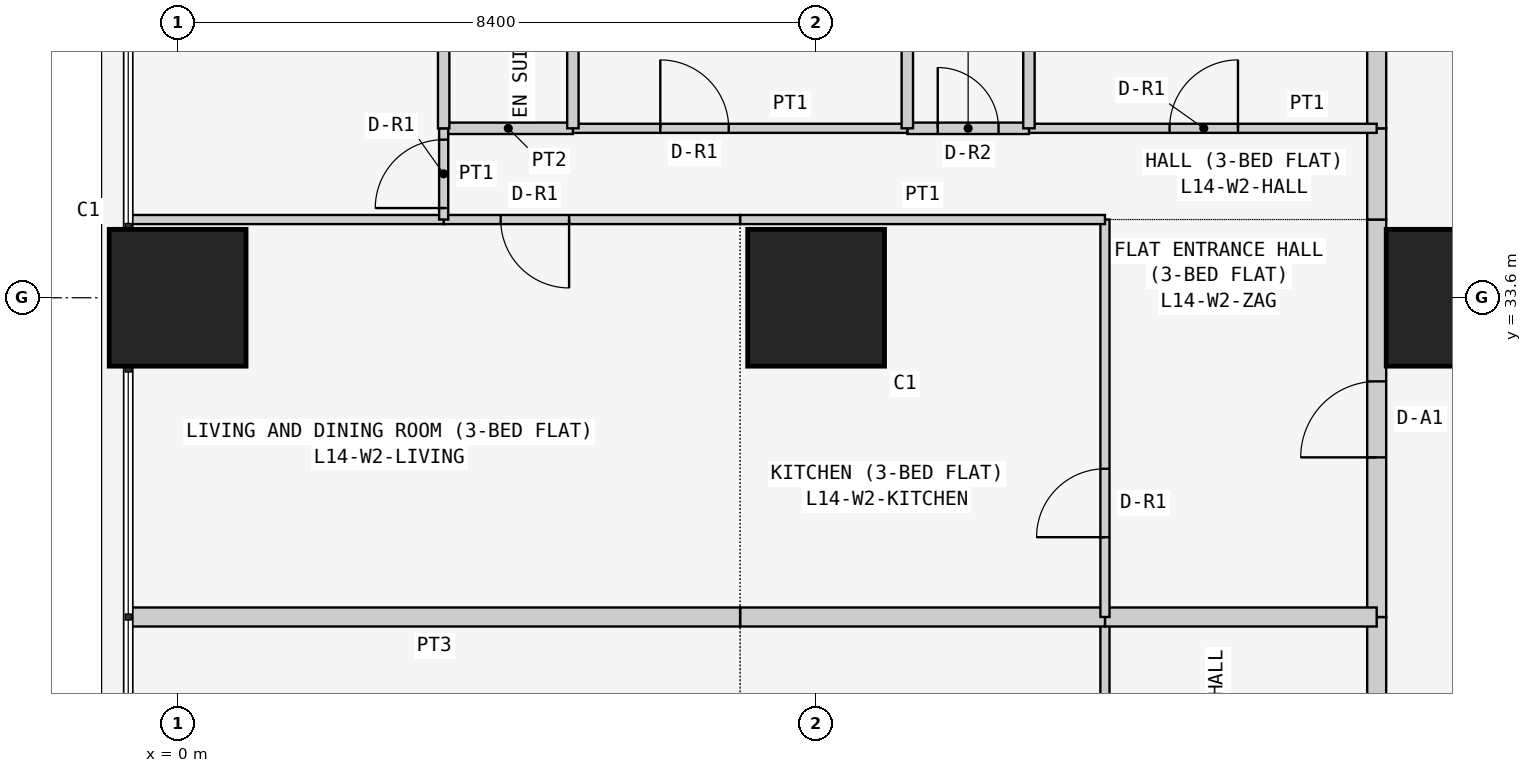
"""IFC4 building model, lengths in metres.
Left out: names, types, materials, properties, quantities, classifications, styles, units other than length and angle.
Written with IfcOpenShell. Run it as: python <this file> out.ifc"""

import sys

from ifc_helpers import new_model, si_unit, direction, frame, frame_2d, origin, origin_2d, place, context, subcontext, project, spatial, rectangle, extrude, element, fill, save


model = new_model("IFC4")
c1 = context("Model", 3, precision=1e-05, world=origin(), true_north=direction((0.0, 1.0)))
c2 = subcontext(c1, "Body", "Model", "MODEL_VIEW")
j1 = project(units=[si_unit("LENGTHUNIT", "METRE"), si_unit("PLANEANGLEUNIT", "RADIAN")], contexts=[c1])
p1 = place(None, origin())
s1 = spatial("IfcSite", under=j1, at=p1, CompositionType="ELEMENT")
p2 = place(p1, origin())
s2 = spatial("IfcBuilding", under=s1, at=p2, CompositionType="ELEMENT")
p3 = place(p2, frame((0.0, 0.0, 59.7)))
s3 = spatial("IfcBuildingStorey", under=s2, at=p3, CompositionType="ELEMENT", Elevation=59.7)
for number, where, z_axis, x_axis in (
    (1, (0.0, 33.6, 0.0), (0.0, 0.0, 1.0), (1.0, 0.0, 0.0)),
    (2, (8.4, 33.6, 0.0), (0.0, 0.0, 1.0), (1.0, 0.0, 0.0)),
    (3, (16.8, 33.6, 0.0), (0.0, 0.0, 1.0), (1.0, 0.0, 0.0)),
):
    element("IfcColumn", number, at=place(p3, frame(where, z_axis=z_axis, x_axis=x_axis)), inside=s3, PredefinedType="COLUMN", context=c2, shape_type="SweptSolid", body=[
        extrude(rectangle(XDim=1.8, YDim=1.8, at=origin_2d()), origin(), (0.0, 0.0, 1.0), 3.6),
    ])
p4 = place(p3, frame((15.775, 24.171, 0.0), z_axis=(0.0, 0.0, 1.0), x_axis=(0.0, 1.0, 0.0)))
e4 = element("IfcWall", 4, at=p4, inside=s3, PredefinedType="PARTITIONING", context=c2, shape_type="SweptSolid", body=[
    extrude(rectangle(XDim=5.229, YDim=0.25, at=frame_2d((2.615, 0.0))), origin(), (0.0, 0.0, 1.0), 3.45),
])
p5 = place(p4, frame((2.129, 0.0, 0.0)))
e5 = element("IfcOpeningElement", 5, at=p5, cuts=e4, PredefinedType="OPENING", context=c2, shape_type="SweptSolid", body=[
    extrude(rectangle(XDim=1.0, YDim=2.1, at=frame_2d((0.5, 1.05))), frame((0.0, 0.135, 0.0), z_axis=(0.0, -1.0, 0.0), x_axis=(1.0, 0.0, 0.0)), (0.0, 0.0, 1.0), 0.27),
])
p6 = place(p3, frame((15.775, 29.4, 0.0), z_axis=(0.0, 0.0, 1.0), x_axis=(0.0, 1.0, 0.0)))
e6 = element("IfcWall", 6, at=p6, inside=s3, PredefinedType="PARTITIONING", context=c2, shape_type="SweptSolid", body=[
    extrude(rectangle(XDim=5.229, YDim=0.25, at=frame_2d((2.615, 0.0))), origin(), (0.0, 0.0, 1.0), 3.45),
])
p7 = place(p6, frame((2.1, 0.0, 0.0)))
e7 = element("IfcOpeningElement", 7, at=p7, cuts=e6, PredefinedType="OPENING", context=c2, shape_type="SweptSolid", body=[
    extrude(rectangle(XDim=1.0, YDim=2.1, at=frame_2d((0.5, 1.05))), frame((0.0, 0.135, 0.0), z_axis=(0.0, -1.0, 0.0), x_axis=(1.0, 0.0, 0.0)), (0.0, 0.0, 1.0), 0.27),
])
p8 = place(p3, frame((15.775, 34.629, 0.0), z_axis=(0.0, 0.0, 1.0), x_axis=(0.0, 1.0, 0.0)))
e8 = element("IfcWall", 8, at=p8, inside=s3, PredefinedType="PARTITIONING", context=c2, shape_type="SweptSolid", body=[
    extrude(rectangle(XDim=1.2, YDim=0.25, at=frame_2d((0.6, 0.0))), origin(), (0.0, 0.0, 1.0), 3.45),
])
p9 = place(p3, frame((15.775, 35.829, 0.0), z_axis=(0.0, 0.0, 1.0), x_axis=(0.0, 1.0, 0.0)))
e9 = element("IfcWall", 9, at=p9, inside=s3, PredefinedType="PARTITIONING", context=c2, shape_type="SweptSolid", body=[
    extrude(rectangle(XDim=6.871, YDim=0.25, at=frame_2d((3.436, 0.0))), origin(), (0.0, 0.0, 1.0), 3.45),
])
p10 = place(p3, frame((12.2, 29.4, 0.0), z_axis=(0.0, 0.0, 1.0), x_axis=(0.0, -1.0, 0.0)))
e10 = element("IfcWall", 10, at=p10, inside=s3, PredefinedType="PARTITIONING", context=c2, shape_type="SweptSolid", body=[
    extrude(rectangle(XDim=5.229, YDim=0.12, at=frame_2d((2.615, 0.0))), origin(), (0.0, 0.0, 1.0), 3.45),
])
p11 = place(p10, frame((1.05, 0.0, 0.0)))
e11 = element("IfcOpeningElement", 11, at=p11, cuts=e10, PredefinedType="OPENING", context=c2, shape_type="SweptSolid", body=[
    extrude(rectangle(XDim=0.9, YDim=2.1, at=frame_2d((0.45, 1.05))), frame((0.0, 0.07, 0.0), z_axis=(0.0, -1.0, 0.0), x_axis=(1.0, 0.0, 0.0)), (0.0, 0.0, 1.0), 0.14),
])
p12 = place(p3, frame((15.775, 29.4, 0.0), z_axis=(0.0, 0.0, 1.0), x_axis=(-1.0, 0.0, 0.0)))
e12 = element("IfcWall", 12, at=p12, inside=s3, PredefinedType="PARTITIONING", context=c2, shape_type="SweptSolid", body=[
    extrude(rectangle(XDim=3.575, YDim=0.25, at=frame_2d((1.788, 0.0))), origin(), (0.0, 0.0, 1.0), 3.45),
])
p13 = place(p3, frame((12.2, 29.4, 0.0), z_axis=(0.0, 0.0, 1.0), x_axis=(-1.0, 0.0, 0.0)))
e13 = element("IfcWall", 13, at=p13, inside=s3, PredefinedType="PARTITIONING", context=c2, shape_type="SweptSolid", body=[
    extrude(rectangle(XDim=4.8, YDim=0.25, at=frame_2d((2.4, 0.0))), origin(), (0.0, 0.0, 1.0), 3.45),
])
p14 = place(p3, frame((7.4, 29.4, 0.0), z_axis=(0.0, 0.0, 1.0), x_axis=(-1.0, 0.0, 0.0)))
e14 = element("IfcWall", 14, at=p14, inside=s3, PredefinedType="PARTITIONING", context=c2, shape_type="SweptSolid", body=[
    extrude(rectangle(XDim=8.05, YDim=0.25, at=frame_2d((4.025, 0.0))), origin(), (0.0, 0.0, 1.0), 3.45),
])
p15 = place(p3, frame((12.2, 29.4, 0.0), z_axis=(0.0, 0.0, 1.0), x_axis=(0.0, 1.0, 0.0)))
e15 = element("IfcWall", 15, at=p15, inside=s3, PredefinedType="PARTITIONING", context=c2, shape_type="SweptSolid", body=[
    extrude(rectangle(XDim=5.229, YDim=0.12, at=frame_2d((2.615, 0.0))), origin(), (0.0, 0.0, 1.0), 3.45),
])
p16 = place(p15, frame((1.05, 0.0, 0.0)))
e16 = element("IfcOpeningElement", 16, at=p16, cuts=e15, PredefinedType="OPENING", context=c2, shape_type="SweptSolid", body=[
    extrude(rectangle(XDim=0.9, YDim=2.1, at=frame_2d((0.45, 1.05))), frame((0.0, 0.07, 0.0), z_axis=(0.0, -1.0, 0.0), x_axis=(1.0, 0.0, 0.0)), (0.0, 0.0, 1.0), 0.14),
])
p17 = place(p3, frame((7.4, 34.629, 0.0), z_axis=(0.0, 0.0, 1.0), x_axis=(1.0, 0.0, 0.0)))
e17 = element("IfcWall", 17, at=p17, inside=s3, PredefinedType="PARTITIONING", context=c2, shape_type="SweptSolid", body=[
    extrude(rectangle(XDim=4.8, YDim=0.12, at=frame_2d((2.4, 0.0))), origin(), (0.0, 0.0, 1.0), 3.45),
])
p18 = place(p3, frame((3.5, 34.629, 0.0), z_axis=(0.0, 0.0, 1.0), x_axis=(1.0, 0.0, 0.0)))
e18 = element("IfcWall", 18, at=p18, inside=s3, PredefinedType="PARTITIONING", context=c2, shape_type="SweptSolid", body=[
    extrude(rectangle(XDim=3.9, YDim=0.12, at=frame_2d((1.95, 0.0))), origin(), (0.0, 0.0, 1.0), 3.45),
])
p19 = place(p18, frame((0.75, 0.0, 0.0)))
e19 = element("IfcOpeningElement", 19, at=p19, cuts=e18, PredefinedType="OPENING", context=c2, shape_type="SweptSolid", body=[
    extrude(rectangle(XDim=0.9, YDim=2.1, at=frame_2d((0.45, 1.05))), frame((0.0, 0.07, 0.0), z_axis=(0.0, -1.0, 0.0), x_axis=(1.0, 0.0, 0.0)), (0.0, 0.0, 1.0), 0.14),
])
p20 = place(p3, frame((-0.65, 34.629, 0.0), z_axis=(0.0, 0.0, 1.0), x_axis=(1.0, 0.0, 0.0)))
e20 = element("IfcWall", 20, at=p20, inside=s3, PredefinedType="PARTITIONING", context=c2, shape_type="SweptSolid", body=[
    extrude(rectangle(XDim=4.15, YDim=0.12, at=frame_2d((2.075, 0.0))), origin(), (0.0, 0.0, 1.0), 3.45),
])
p21 = place(p3, frame((11.2, 35.829, 0.0), z_axis=(0.0, 0.0, 1.0), x_axis=(1.0, 0.0, 0.0)))
e21 = element("IfcWall", 21, at=p21, inside=s3, PredefinedType="PARTITIONING", context=c2, shape_type="SweptSolid", body=[
    extrude(rectangle(XDim=4.575, YDim=0.12, at=frame_2d((2.288, 0.0))), origin(), (0.0, 0.0, 1.0), 3.45),
])
p22 = place(p21, frame((1.85, 0.0, 0.0)))
e22 = element("IfcOpeningElement", 22, at=p22, cuts=e21, PredefinedType="OPENING", context=c2, shape_type="SweptSolid", body=[
    extrude(rectangle(XDim=0.9, YDim=2.1, at=frame_2d((0.45, 1.05))), frame((0.0, 0.07, 0.0), z_axis=(0.0, -1.0, 0.0), x_axis=(1.0, 0.0, 0.0)), (0.0, 0.0, 1.0), 0.14),
])
p23 = place(p3, frame((9.6, 35.829, 0.0), z_axis=(0.0, 0.0, 1.0), x_axis=(1.0, 0.0, 0.0)))
e23 = element("IfcWall", 23, at=p23, inside=s3, PredefinedType="PARTITIONING", context=c2, shape_type="SweptSolid", body=[
    extrude(rectangle(XDim=1.6, YDim=0.15, at=frame_2d((0.8, 0.0))), origin(), (0.0, 0.0, 1.0), 3.45),
])
p24 = place(p23, frame((0.4, 0.0, 0.0)))
e24 = element("IfcOpeningElement", 24, at=p24, cuts=e23, PredefinedType="OPENING", context=c2, shape_type="SweptSolid", body=[
    extrude(rectangle(XDim=0.8, YDim=2.1, at=frame_2d((0.4, 1.05))), frame((0.0, 0.085, 0.0), z_axis=(0.0, -1.0, 0.0), x_axis=(1.0, 0.0, 0.0)), (0.0, 0.0, 1.0), 0.17),
])
p25 = place(p3, frame((5.2, 35.829, 0.0), z_axis=(0.0, 0.0, 1.0), x_axis=(1.0, 0.0, 0.0)))
e25 = element("IfcWall", 25, at=p25, inside=s3, PredefinedType="PARTITIONING", context=c2, shape_type="SweptSolid", body=[
    extrude(rectangle(XDim=4.4, YDim=0.12, at=frame_2d((2.2, 0.0))), origin(), (0.0, 0.0, 1.0), 3.45),
])
p26 = place(p25, frame((1.15, 0.0, 0.0)))
e26 = element("IfcOpeningElement", 26, at=p26, cuts=e25, PredefinedType="OPENING", context=c2, shape_type="SweptSolid", body=[
    extrude(rectangle(XDim=0.9, YDim=2.1, at=frame_2d((0.45, 1.05))), frame((0.0, 0.07, 0.0), z_axis=(0.0, -1.0, 0.0), x_axis=(1.0, 0.0, 0.0)), (0.0, 0.0, 1.0), 0.14),
])
p27 = place(p3, frame((3.5, 35.829, 0.0), z_axis=(0.0, 0.0, 1.0), x_axis=(1.0, 0.0, 0.0)))
e27 = element("IfcWall", 27, at=p27, inside=s3, PredefinedType="PARTITIONING", context=c2, shape_type="SweptSolid", body=[
    extrude(rectangle(XDim=1.7, YDim=0.15, at=frame_2d((0.85, 0.0))), origin(), (0.0, 0.0, 1.0), 3.45),
])
p28 = place(p3, frame((3.5, 34.629, 0.0), z_axis=(0.0, 0.0, 1.0), x_axis=(0.0, 1.0, 0.0)))
e28 = element("IfcWall", 28, at=p28, inside=s3, PredefinedType="PARTITIONING", context=c2, shape_type="SweptSolid", body=[
    extrude(rectangle(XDim=1.2, YDim=0.12, at=frame_2d((0.6, 0.0))), origin(), (0.0, 0.0, 1.0), 3.45),
])
p29 = place(p28, frame((0.151, 0.0, 0.0)))
e29 = element("IfcOpeningElement", 29, at=p29, cuts=e28, PredefinedType="OPENING", context=c2, shape_type="SweptSolid", body=[
    extrude(rectangle(XDim=0.9, YDim=2.1, at=frame_2d((0.45, 1.05))), frame((0.0, 0.07, 0.0), z_axis=(0.0, -1.0, 0.0), x_axis=(1.0, 0.0, 0.0)), (0.0, 0.0, 1.0), 0.14),
])
for number, where, z_axis, x_axis in (
    (30, (11.2, 35.829, 0.0), (0.0, 0.0, 1.0), (0.0, 1.0, 0.0)),
    (31, (9.6, 35.829, 0.0), (0.0, 0.0, 1.0), (0.0, 1.0, 0.0)),
    (32, (5.2, 35.829, 0.0), (0.0, 0.0, 1.0), (0.0, 1.0, 0.0)),
):
    element("IfcWall", number, at=place(p3, frame(where, z_axis=z_axis, x_axis=x_axis)), inside=s3, PredefinedType="PARTITIONING", context=c2, shape_type="SweptSolid", body=[
        extrude(rectangle(XDim=6.871, YDim=0.15, at=frame_2d((3.436, 0.0))), origin(), (0.0, 0.0, 1.0), 3.45),
    ])
p30 = place(p3, frame((3.5, 35.829, 0.0), z_axis=(0.0, 0.0, 1.0), x_axis=(0.0, 1.0, 0.0)))
e33 = element("IfcWall", 33, at=p30, inside=s3, PredefinedType="PARTITIONING", context=c2, shape_type="SweptSolid", body=[
    extrude(rectangle(XDim=6.871, YDim=0.15, at=frame_2d((3.436, 0.0))), origin(), (0.0, 0.0, 1.0), 3.45),
])
p31 = place(p30, frame((3.171, 0.0, 0.0)))
e34 = element("IfcOpeningElement", 34, at=p31, cuts=e33, PredefinedType="OPENING", context=c2, shape_type="SweptSolid", body=[
    extrude(rectangle(XDim=0.8, YDim=2.1, at=frame_2d((0.4, 1.05))), frame((0.0, 0.085, 0.0), z_axis=(0.0, -1.0, 0.0), x_axis=(1.0, 0.0, 0.0)), (0.0, 0.0, 1.0), 0.17),
])
p32 = place(p7, origin())
e35 = element("IfcDoor", 35, at=p32, inside=s3, OperationType="SINGLE_SWING_LEFT", PredefinedType="DOOR", context=c2, shape_type="SweptSolid", body=[
    extrude(rectangle(XDim=1.0, YDim=2.1, at=frame_2d((0.5, 1.05))), frame((0.0, 0.025, 0.0), z_axis=(0.0, -1.0, 0.0), x_axis=(1.0, 0.0, 0.0)), (0.0, 0.0, 1.0), 0.05),
])
fill(e7, e35)
p33 = place(p16, origin())
e36 = element("IfcDoor", 36, at=p33, inside=s3, OperationType="SINGLE_SWING_LEFT", PredefinedType="DOOR", context=c2, shape_type="SweptSolid", body=[
    extrude(rectangle(XDim=0.9, YDim=2.1, at=frame_2d((0.45, 1.05))), frame((0.0, 0.025, 0.0), z_axis=(0.0, -1.0, 0.0), x_axis=(1.0, 0.0, 0.0)), (0.0, 0.0, 1.0), 0.05),
])
fill(e16, e36)
p34 = place(p19, frame((0.9, 0.0, 0.0), z_axis=(0.0, 0.0, 1.0), x_axis=(-1.0, 0.0, 0.0)))
e37 = element("IfcDoor", 37, at=p34, inside=s3, OperationType="SINGLE_SWING_LEFT", PredefinedType="DOOR", context=c2, shape_type="SweptSolid", body=[
    extrude(rectangle(XDim=0.9, YDim=2.1, at=frame_2d((0.45, 1.05))), frame((0.0, 0.025, 0.0), z_axis=(0.0, -1.0, 0.0), x_axis=(1.0, 0.0, 0.0)), (0.0, 0.0, 1.0), 0.05),
])
fill(e19, e37)
p35 = place(p22, origin())
e38 = element("IfcDoor", 38, at=p35, inside=s3, OperationType="SINGLE_SWING_RIGHT", PredefinedType="DOOR", context=c2, shape_type="SweptSolid", body=[
    extrude(rectangle(XDim=0.9, YDim=2.1, at=frame_2d((0.45, 1.05))), frame((0.0, 0.025, 0.0), z_axis=(0.0, -1.0, 0.0), x_axis=(1.0, 0.0, 0.0)), (0.0, 0.0, 1.0), 0.05),
])
fill(e22, e38)
p36 = place(p24, origin())
e39 = element("IfcDoor", 39, at=p36, inside=s3, OperationType="SINGLE_SWING_LEFT", PredefinedType="DOOR", context=c2, shape_type="SweptSolid", body=[
    extrude(rectangle(XDim=0.8, YDim=2.1, at=frame_2d((0.4, 1.05))), frame((0.0, 0.025, 0.0), z_axis=(0.0, -1.0, 0.0), x_axis=(1.0, 0.0, 0.0)), (0.0, 0.0, 1.0), 0.05),
])
fill(e24, e39)
p37 = place(p26, origin())
e40 = element("IfcDoor", 40, at=p37, inside=s3, OperationType="SINGLE_SWING_LEFT", PredefinedType="DOOR", context=c2, shape_type="SweptSolid", body=[
    extrude(rectangle(XDim=0.9, YDim=2.1, at=frame_2d((0.45, 1.05))), frame((0.0, 0.025, 0.0), z_axis=(0.0, -1.0, 0.0), x_axis=(1.0, 0.0, 0.0)), (0.0, 0.0, 1.0), 0.05),
])
fill(e26, e40)
p38 = place(p29, origin())
e41 = element("IfcDoor", 41, at=p38, inside=s3, OperationType="SINGLE_SWING_LEFT", PredefinedType="DOOR", context=c2, shape_type="SweptSolid", body=[
    extrude(rectangle(XDim=0.9, YDim=2.1, at=frame_2d((0.45, 1.05))), frame((0.0, 0.025, 0.0), z_axis=(0.0, -1.0, 0.0), x_axis=(1.0, 0.0, 0.0)), (0.0, 0.0, 1.0), 0.05),
])
fill(e29, e41)
save(model, sys.argv[1])
